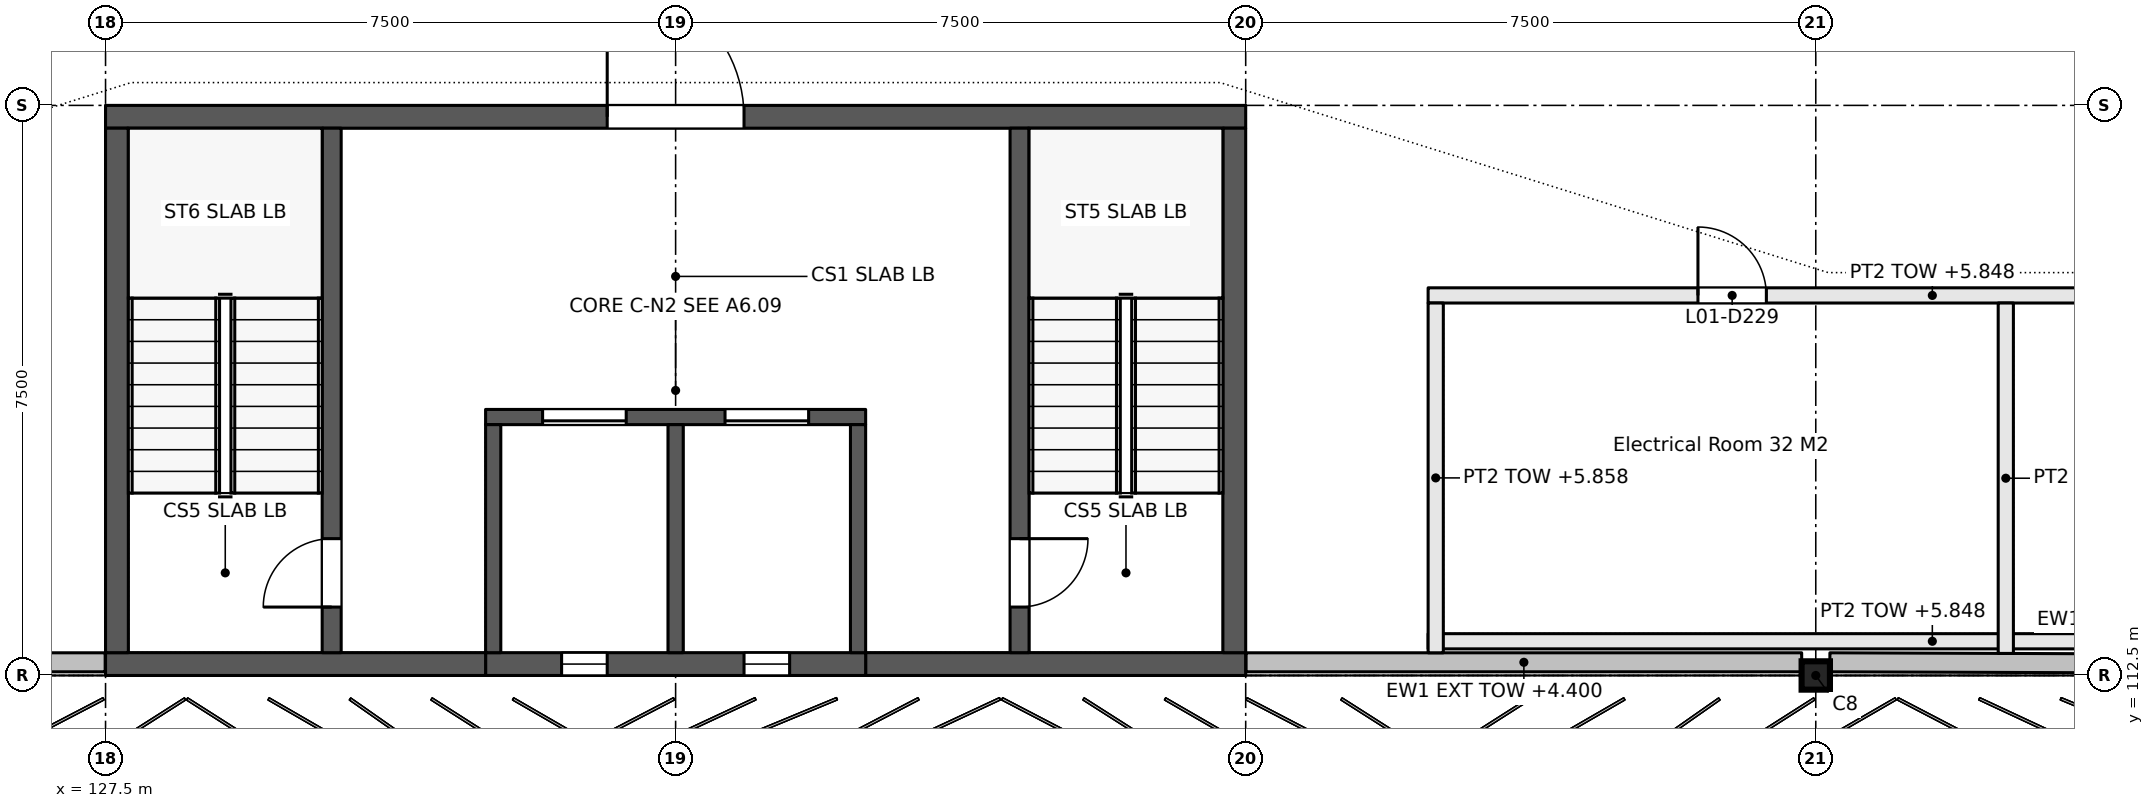
"""IFC4 building model, lengths in metres.
Left out: names, types, materials, properties, quantities, classifications, styles, units other than length and angle.
Written with IfcOpenShell. Run it as: python <this file> out.ifc"""

import sys

from ifc_helpers import new_model, si_unit, direction, frame, frame_2d, origin, origin_2d, place, context, subcontext, project, spatial, rectangle, i_section, extrude, element, fill, save


model = new_model("IFC4")
c1 = context("Model", 3, precision=1e-05, world=origin(), true_north=direction((0.0, 1.0)))
c2 = subcontext(c1, "Body", "Model", "MODEL_VIEW")
j1 = project(units=[si_unit("LENGTHUNIT", "METRE"), si_unit("PLANEANGLEUNIT", "RADIAN")], contexts=[c1])
p1 = place(None, origin())
s1 = spatial("IfcSite", under=j1, at=p1, CompositionType="ELEMENT")
p2 = place(p1, origin())
s2 = spatial("IfcBuilding", under=s1, at=p2, CompositionType="ELEMENT")
p3 = place(p2, frame((0.0, 0.0, 3.3)))
s3 = spatial("IfcBuildingStorey", under=s2, at=p3, CompositionType="ELEMENT", Elevation=3.3)
p4 = place(p3, frame((150.0, 112.5, 0.0), z_axis=(0.0, 0.0, 1.0), x_axis=(1.0, 0.0, 0.0)))
e1 = element("IfcColumn", 1, at=p4, inside=s3, PredefinedType="COLUMN", context=c2, shape_type="SweptSolid", body=[
    extrude(i_section(OverallWidth=0.373, OverallDepth=0.373, WebThickness=0.016, FlangeThickness=0.026, FilletRadius=0.015, at=origin_2d()), origin(), (0.0, 0.0, 1.0), 3.3),
])
p5 = place(p3, frame((144.9, 112.95, 0.0), z_axis=(0.0, 0.0, 1.0), x_axis=(1.0, 0.0, 0.0)))
e2 = element("IfcWall", 2, at=p5, inside=s3, PredefinedType="PARTITIONING", context=c2, shape_type="SweptSolid", body=[
    extrude(rectangle(XDim=15.2, YDim=0.2, at=frame_2d((7.6, 0.0))), origin(), (0.0, 0.0, 1.0), 2.548),
])
p6 = place(p3, frame((144.9, 117.5, 0.0), z_axis=(0.0, 0.0, 1.0), x_axis=(1.0, 0.0, 0.0)))
e3 = element("IfcWall", 3, at=p6, inside=s3, PredefinedType="PARTITIONING", context=c2, shape_type="SweptSolid", body=[
    extrude(rectangle(XDim=15.2, YDim=0.2, at=frame_2d((7.6, 0.0))), origin(), (0.0, 0.0, 1.0), 2.548),
])
p7 = place(p6, frame((3.55, 0.0, 0.0)))
e4 = element("IfcOpeningElement", 4, at=p7, cuts=e3, PredefinedType="OPENING", context=c2, shape_type="SweptSolid", body=[
    extrude(rectangle(XDim=0.9, YDim=2.1, at=frame_2d((0.45, 1.05))), frame((0.0, 0.11, 0.0), z_axis=(0.0, -1.0, 0.0), x_axis=(1.0, 0.0, 0.0)), (0.0, 0.0, 1.0), 0.22),
])
p8 = place(p6, frame((10.875, 0.0, 0.0)))
e5 = element("IfcOpeningElement", 5, at=p8, cuts=e3, PredefinedType="OPENING", context=c2, shape_type="SweptSolid", body=[
    extrude(rectangle(XDim=0.9, YDim=2.1, at=frame_2d((0.45, 1.05))), frame((0.0, 0.11, 0.0), z_axis=(0.0, -1.0, 0.0), x_axis=(1.0, 0.0, 0.0)), (0.0, 0.0, 1.0), 0.22),
])
p9 = place(p3, frame((145.0, 112.798, 0.0), z_axis=(0.0, 0.0, 1.0), x_axis=(0.0, 1.0, 0.0)))
e6 = element("IfcWall", 6, at=p9, inside=s3, PredefinedType="PARTITIONING", context=c2, shape_type="SweptSolid", body=[
    extrude(rectangle(XDim=4.602, YDim=0.2, at=frame_2d((2.301, 0.0))), origin(), (0.0, 0.0, 1.0), 2.558),
])
p10 = place(p3, frame((152.5, 112.79, 0.0), z_axis=(0.0, 0.0, 1.0), x_axis=(0.0, 1.0, 0.0)))
e7 = element("IfcWall", 7, at=p10, inside=s3, PredefinedType="PARTITIONING", context=c2, shape_type="SweptSolid", body=[
    extrude(rectangle(XDim=4.61, YDim=0.2, at=frame_2d((2.305, 0.0))), origin(), (0.0, 0.0, 1.0), 2.558),
])
for number, where, z_axis, x_axis in (
    (8, (120.186, 112.673, 0.0), (0.0, 0.0, 1.0), (1.0, 0.0, 0.0)),
    (9, (142.505, 112.673, 0.0), (0.0, 0.0, 1.0), (1.0, 0.0, 0.0)),
):
    element("IfcWall", number, at=place(p3, frame(where, z_axis=z_axis, x_axis=x_axis)), inside=s3, PredefinedType="SOLIDWALL", context=c2, shape_type="SweptSolid", body=[
        extrude(rectangle(XDim=7.31, YDim=0.25, at=frame_2d((3.655, 0.0))), origin(), (0.0, 0.0, 1.0), 1.1),
    ])
p11 = place(p3, frame((150.186, 112.673, 0.0), z_axis=(0.0, 0.0, 1.0), x_axis=(0.999993473402, -0.003612914829, 0.0)))
e10 = element("IfcWall", 10, at=p11, inside=s3, PredefinedType="SOLIDWALL", context=c2, shape_type="SweptSolid", body=[
    extrude(rectangle(XDim=7.163, YDim=0.25, at=frame_2d((3.582, 0.0))), origin(), (0.0, 0.0, 1.0), 1.1),
])
p12 = place(p3, frame((127.5, 119.85, 0.0), z_axis=(0.0, 0.0, 1.0), x_axis=(1.0, 0.0, 0.0)))
e11 = element("IfcWall", 11, at=p12, inside=s3, PredefinedType="SHEAR", context=c2, shape_type="SweptSolid", body=[
    extrude(rectangle(XDim=15.0, YDim=0.3, at=frame_2d((7.5, 0.0))), origin(), (0.0, 0.0, 1.0), 3.3),
])
p13 = place(p12, frame((6.6, 0.0, 0.0)))
e12 = element("IfcOpeningElement", 12, at=p13, cuts=e11, PredefinedType="OPENING", context=c2, shape_type="SweptSolid", body=[
    extrude(rectangle(XDim=1.8, YDim=2.1, at=frame_2d((0.9, 1.05))), frame((0.0, 0.16, 0.0), z_axis=(0.0, -1.0, 0.0), x_axis=(1.0, 0.0, 0.0)), (0.0, 0.0, 1.0), 0.32),
])
p14 = place(p3, frame((142.5, 112.65, 0.0), z_axis=(0.0, 0.0, 1.0), x_axis=(-1.0, 0.0, 0.0)))
e13 = element("IfcWall", 13, at=p14, inside=s3, PredefinedType="SHEAR", context=c2, shape_type="SweptSolid", body=[
    extrude(rectangle(XDim=5.0, YDim=0.3, at=frame_2d((2.5, 0.0))), origin(), (0.0, 0.0, 1.0), 3.3),
])
p15 = place(p3, frame((137.5, 112.65, 0.0), z_axis=(0.0, 0.0, 1.0), x_axis=(-1.0, 0.0, 0.0)))
e14 = element("IfcWall", 14, at=p15, inside=s3, PredefinedType="SHEAR", context=c2, shape_type="SweptSolid", body=[
    extrude(rectangle(XDim=5.0, YDim=0.3, at=frame_2d((2.5, 0.0))), origin(), (0.0, 0.0, 1.0), 3.3),
])
p16 = place(p15, frame((1.0, 0.0, 0.3)))
e15 = element("IfcOpeningElement", 15, at=p16, cuts=e14, PredefinedType="OPENING", context=c2, shape_type="SweptSolid", body=[
    extrude(rectangle(XDim=0.6, YDim=2.7, at=frame_2d((0.3, 1.35))), frame((0.0, 0.16, 0.0), z_axis=(0.0, -1.0, 0.0), x_axis=(1.0, 0.0, 0.0)), (0.0, 0.0, 1.0), 0.32),
])
p17 = place(p15, frame((3.4, 0.0, 0.3)))
e16 = element("IfcOpeningElement", 16, at=p17, cuts=e14, PredefinedType="OPENING", context=c2, shape_type="SweptSolid", body=[
    extrude(rectangle(XDim=0.6, YDim=2.7, at=frame_2d((0.3, 1.35))), frame((0.0, 0.16, 0.0), z_axis=(0.0, -1.0, 0.0), x_axis=(1.0, 0.0, 0.0)), (0.0, 0.0, 1.0), 0.32),
])
p18 = place(p3, frame((132.5, 112.65, 0.0), z_axis=(0.0, 0.0, 1.0), x_axis=(-1.0, 0.0, 0.0)))
e17 = element("IfcWall", 17, at=p18, inside=s3, PredefinedType="SHEAR", context=c2, shape_type="SweptSolid", body=[
    extrude(rectangle(XDim=5.0, YDim=0.3, at=frame_2d((2.5, 0.0))), origin(), (0.0, 0.0, 1.0), 3.3),
])
for number, where, z_axis, x_axis in (
    (18, (142.35, 119.7, 0.0), (0.0, 0.0, 1.0), (0.0, -1.0, 0.0)),
    (19, (127.65, 119.7, 0.0), (0.0, 0.0, 1.0), (0.0, -1.0, 0.0)),
):
    element("IfcWall", number, at=place(p3, frame(where, z_axis=z_axis, x_axis=x_axis)), inside=s3, PredefinedType="SHEAR", context=c2, shape_type="SweptSolid", body=[
        extrude(rectangle(XDim=6.9, YDim=0.3, at=frame_2d((3.45, 0.0))), origin(), (0.0, 0.0, 1.0), 3.3),
    ])
p19 = place(p3, frame((139.525, 119.7, 0.0), z_axis=(0.0, 0.0, 1.0), x_axis=(0.0, -1.0, 0.0)))
e20 = element("IfcWall", 20, at=p19, inside=s3, PredefinedType="STANDARD", context=c2, shape_type="SweptSolid", body=[
    extrude(rectangle(XDim=6.9, YDim=0.25, at=frame_2d((3.45, 0.0))), origin(), (0.0, 0.0, 1.0), 3.1),
])
p20 = place(p19, frame((5.4, 0.0, 0.0)))
e21 = element("IfcOpeningElement", 21, at=p20, cuts=e20, PredefinedType="OPENING", context=c2, shape_type="SweptSolid", body=[
    extrude(rectangle(XDim=0.9, YDim=2.1, at=frame_2d((0.45, 1.05))), frame((0.0, 0.135, 0.0), z_axis=(0.0, -1.0, 0.0), x_axis=(1.0, 0.0, 0.0)), (0.0, 0.0, 1.0), 0.27),
])
p21 = place(p3, frame((130.475, 112.8, 0.0), z_axis=(0.0, 0.0, 1.0), x_axis=(0.0, 1.0, 0.0)))
e22 = element("IfcWall", 22, at=p21, inside=s3, PredefinedType="STANDARD", context=c2, shape_type="SweptSolid", body=[
    extrude(rectangle(XDim=6.9, YDim=0.25, at=frame_2d((3.45, 0.0))), origin(), (0.0, 0.0, 1.0), 3.1),
])
p22 = place(p21, frame((0.6, 0.0, 0.0)))
e23 = element("IfcOpeningElement", 23, at=p22, cuts=e22, PredefinedType="OPENING", context=c2, shape_type="SweptSolid", body=[
    extrude(rectangle(XDim=0.9, YDim=2.1, at=frame_2d((0.45, 1.05))), frame((0.0, 0.135, 0.0), z_axis=(0.0, -1.0, 0.0), x_axis=(1.0, 0.0, 0.0)), (0.0, 0.0, 1.0), 0.27),
])
p23 = place(p3, frame((137.5, 115.9, 0.0), z_axis=(0.0, 0.0, 1.0), x_axis=(-1.0, 0.0, 0.0)))
e24 = element("IfcWall", 24, at=p23, inside=s3, PredefinedType="STANDARD", context=c2, shape_type="SweptSolid", body=[
    extrude(rectangle(XDim=5.0, YDim=0.2, at=frame_2d((2.5, 0.0))), origin(), (0.0, 0.0, 1.0), 3.1),
])
p24 = place(p23, frame((0.75, 0.0, 0.0)))
e25 = element("IfcOpeningElement", 25, at=p24, cuts=e24, PredefinedType="OPENING", context=c2, shape_type="SweptSolid", body=[
    extrude(rectangle(XDim=1.1, YDim=2.1, at=frame_2d((0.55, 1.05))), frame((0.0, 0.11, 0.0), z_axis=(0.0, -1.0, 0.0), x_axis=(1.0, 0.0, 0.0)), (0.0, 0.0, 1.0), 0.22),
])
p25 = place(p23, frame((3.15, 0.0, 0.0)))
e26 = element("IfcOpeningElement", 26, at=p25, cuts=e24, PredefinedType="OPENING", context=c2, shape_type="SweptSolid", body=[
    extrude(rectangle(XDim=1.1, YDim=2.1, at=frame_2d((0.55, 1.05))), frame((0.0, 0.11, 0.0), z_axis=(0.0, -1.0, 0.0), x_axis=(1.0, 0.0, 0.0)), (0.0, 0.0, 1.0), 0.22),
])
for number, where, z_axis, x_axis in (
    (27, (137.4, 115.8, 0.0), (0.0, 0.0, 1.0), (0.0, -1.0, 0.0)),
    (28, (135.0, 115.8, 0.0), (0.0, 0.0, 1.0), (0.0, -1.0, 0.0)),
    (29, (132.6, 115.8, 0.0), (0.0, 0.0, 1.0), (0.0, -1.0, 0.0)),
):
    element("IfcWall", number, at=place(p3, frame(where, z_axis=z_axis, x_axis=x_axis)), inside=s3, PredefinedType="STANDARD", context=c2, shape_type="SweptSolid", body=[
        extrude(rectangle(XDim=3.0, YDim=0.2, at=frame_2d((1.5, 0.0))), origin(), (0.0, 0.0, 1.0), 3.1),
    ])
p26 = place(p7, origin())
e30 = element("IfcDoor", 30, at=p26, inside=s3, OperationType="SINGLE_SWING_LEFT", PredefinedType="DOOR", context=c2, shape_type="SweptSolid", body=[
    extrude(rectangle(XDim=0.9, YDim=2.1, at=frame_2d((0.45, 1.05))), frame((0.0, 0.025, 0.0), z_axis=(0.0, -1.0, 0.0), x_axis=(1.0, 0.0, 0.0)), (0.0, 0.0, 1.0), 0.05),
])
fill(e4, e30)
p27 = place(p13, origin())
e31 = element("IfcDoor", 31, at=p27, inside=s3, OperationType="DOUBLE_DOOR_SINGLE_SWING", PredefinedType="DOOR", context=c2, shape_type="SweptSolid", body=[
    extrude(rectangle(XDim=1.8, YDim=2.1, at=frame_2d((0.9, 1.05))), frame((0.0, 0.025, 0.0), z_axis=(0.0, -1.0, 0.0), x_axis=(1.0, 0.0, 0.0)), (0.0, 0.0, 1.0), 0.05),
])
fill(e12, e31)
p28 = place(p20, origin())
e32 = element("IfcDoor", 32, at=p28, inside=s3, OperationType="SINGLE_SWING_LEFT", PredefinedType="DOOR", context=c2, shape_type="SweptSolid", body=[
    extrude(rectangle(XDim=0.9, YDim=2.1, at=frame_2d((0.45, 1.05))), frame((0.0, 0.025, 0.0), z_axis=(0.0, -1.0, 0.0), x_axis=(1.0, 0.0, 0.0)), (0.0, 0.0, 1.0), 0.05),
])
fill(e21, e32)
p29 = place(p22, origin())
e33 = element("IfcDoor", 33, at=p29, inside=s3, OperationType="SINGLE_SWING_RIGHT", PredefinedType="DOOR", context=c2, shape_type="SweptSolid", body=[
    extrude(rectangle(XDim=0.9, YDim=2.1, at=frame_2d((0.45, 1.05))), frame((0.0, 0.025, 0.0), z_axis=(0.0, -1.0, 0.0), x_axis=(1.0, 0.0, 0.0)), (0.0, 0.0, 1.0), 0.05),
])
fill(e23, e33)
p30 = place(p24, origin())
e34 = element("IfcDoor", 34, at=p30, inside=s3, OperationType="DOUBLE_DOOR_SLIDING", PredefinedType="DOOR", context=c2, shape_type="SweptSolid", body=[
    extrude(rectangle(XDim=1.1, YDim=2.1, at=frame_2d((0.55, 1.05))), frame((0.0, 0.025, 0.0), z_axis=(0.0, -1.0, 0.0), x_axis=(1.0, 0.0, 0.0)), (0.0, 0.0, 1.0), 0.05),
])
fill(e25, e34)
p31 = place(p25, origin())
e35 = element("IfcDoor", 35, at=p31, inside=s3, OperationType="DOUBLE_DOOR_SLIDING", PredefinedType="DOOR", context=c2, shape_type="SweptSolid", body=[
    extrude(rectangle(XDim=1.1, YDim=2.1, at=frame_2d((0.55, 1.05))), frame((0.0, 0.025, 0.0), z_axis=(0.0, -1.0, 0.0), x_axis=(1.0, 0.0, 0.0)), (0.0, 0.0, 1.0), 0.05),
])
fill(e26, e35)
p32 = place(p16, origin())
e36 = element("IfcWindow", 36, at=p32, inside=s3, PartitioningType="SINGLE_PANEL", PredefinedType="WINDOW", context=c2, shape_type="SweptSolid", body=[
    extrude(rectangle(XDim=0.6, YDim=2.7, at=frame_2d((0.3, 1.35))), frame((0.0, 0.03, 0.0), z_axis=(0.0, -1.0, 0.0), x_axis=(1.0, 0.0, 0.0)), (0.0, 0.0, 1.0), 0.06),
])
fill(e15, e36)
p33 = place(p17, origin())
e37 = element("IfcWindow", 37, at=p33, inside=s3, PartitioningType="SINGLE_PANEL", PredefinedType="WINDOW", context=c2, shape_type="SweptSolid", body=[
    extrude(rectangle(XDim=0.6, YDim=2.7, at=frame_2d((0.3, 1.35))), frame((0.0, 0.03, 0.0), z_axis=(0.0, -1.0, 0.0), x_axis=(1.0, 0.0, 0.0)), (0.0, 0.0, 1.0), 0.06),
])
fill(e16, e37)
save(model, sys.argv[1])
